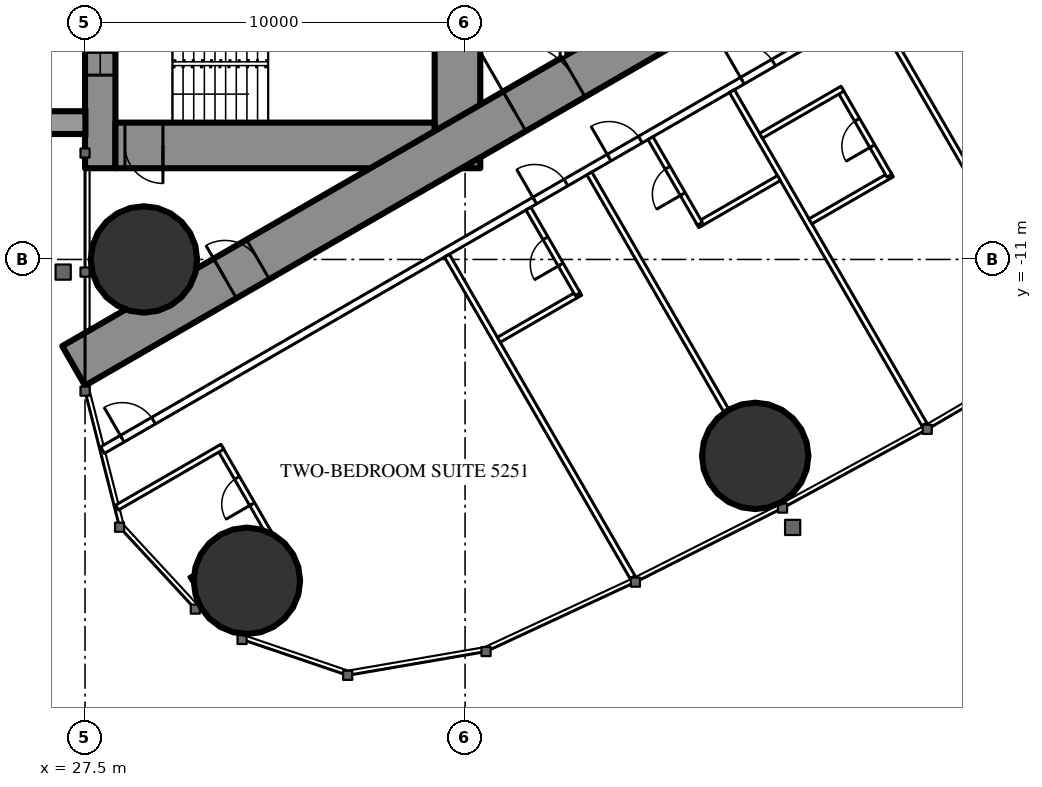
"""IFC4 building model, lengths in metres.
Left out: names, types, materials, properties, quantities, classifications, styles, units other than length and angle.
Written with IfcOpenShell. Run it as: python <this file> out.ifc"""

import sys

from ifc_helpers import new_model, si_unit, direction, frame, frame_2d, origin, origin_2d, place, context, subcontext, project, spatial, rectangle, circle, extrude, element, fill, save


model = new_model("IFC4")
c1 = context("Model", 3, precision=1e-05, world=origin(), true_north=direction((0.0, 1.0)))
c2 = subcontext(c1, "Body", "Model", "MODEL_VIEW")
j1 = project(units=[si_unit("LENGTHUNIT", "METRE"), si_unit("PLANEANGLEUNIT", "RADIAN")], contexts=[c1])
p1 = place(None, origin())
s1 = spatial("IfcSite", under=j1, at=p1, CompositionType="ELEMENT")
p2 = place(p1, origin())
s2 = spatial("IfcBuilding", under=s1, at=p2, CompositionType="ELEMENT")
p3 = place(p2, frame((0.0, 0.0, 194.8)))
s3 = spatial("IfcBuildingStorey", under=s2, at=p3, CompositionType="ELEMENT", Elevation=194.8)
for number, where, z_axis, x_axis in (
    (1, (31.76, -19.456, 0.0), (0.0, 0.0, 1.0), (1.0, 0.0, 0.0)),
    (2, (29.05, -11.0, 0.0), (0.0, 0.0, 1.0), (1.0, 0.0, 0.0)),
    (3, (45.134, -16.168, 0.0), (0.0, 0.0, 1.0), (1.0, 0.0, 0.0)),
):
    element("IfcColumn", number, at=place(p3, frame(where, z_axis=z_axis, x_axis=x_axis)), inside=s3, PredefinedType="COLUMN", context=c2, shape_type="SweptSolid", body=[
        extrude(circle(Radius=1.4, at=origin_2d()), origin(), (0.0, 0.0, 1.0), 3.5),
    ])
p4 = place(p3, frame((27.9, -8.6, 0.0), z_axis=(0.0, 0.0, 1.0), x_axis=(0.0, 1.0, 0.0)))
e4 = element("IfcWall", 4, at=p4, inside=s3, PredefinedType="SHEAR", context=c2, shape_type="SweptSolid", body=[
    extrude(rectangle(XDim=17.2, YDim=0.8, at=frame_2d((8.6, 0.0))), origin(), (0.0, 0.0, 1.0), 3.5),
])
p5 = place(p4, frame((2.45, 0.0, 0.6)))
e5 = element("IfcOpeningElement", 5, at=p5, cuts=e4, PredefinedType="OPENING", context=c2, shape_type="SweptSolid", body=[
    extrude(rectangle(XDim=0.6, YDim=2.1, at=frame_2d((0.3, 1.05))), frame((0.0, 0.41, 0.0), z_axis=(0.0, -1.0, 0.0), x_axis=(1.0, 0.0, 0.0)), (0.0, 0.0, 1.0), 0.82),
])
p6 = place(p4, frame((14.15, 0.0, 0.6)))
e6 = element("IfcOpeningElement", 6, at=p6, cuts=e4, PredefinedType="OPENING", context=c2, shape_type="SweptSolid", body=[
    extrude(rectangle(XDim=0.6, YDim=2.1, at=frame_2d((0.3, 1.05))), frame((0.0, 0.41, 0.0), z_axis=(0.0, -1.0, 0.0), x_axis=(1.0, 0.0, 0.0)), (0.0, 0.0, 1.0), 0.82),
])
p7 = place(p3, frame((37.3, -8.6, 0.0), z_axis=(0.0, 0.0, 1.0), x_axis=(0.0, 1.0, 0.0)))
e7 = element("IfcWall", 7, at=p7, inside=s3, PredefinedType="SHEAR", context=c2, shape_type="SweptSolid", body=[
    extrude(rectangle(XDim=17.2, YDim=1.2, at=frame_2d((8.6, 0.0))), origin(), (0.0, 0.0, 1.0), 3.5),
])
p8 = place(p7, frame((7.7, 0.0, 0.0)))
e8 = element("IfcOpeningElement", 8, at=p8, cuts=e7, PredefinedType="OPENING", context=c2, shape_type="SweptSolid", body=[
    extrude(rectangle(XDim=1.8, YDim=2.2, at=frame_2d((0.9, 1.1))), frame((0.0, 0.61, 0.0), z_axis=(0.0, -1.0, 0.0), x_axis=(1.0, 0.0, 0.0)), (0.0, 0.0, 1.0), 1.22),
])
p9 = place(p3, frame((28.3, -8.0, 0.0), z_axis=(0.0, 0.0, 1.0), x_axis=(1.0, 0.0, 0.0)))
e9 = element("IfcWall", 9, at=p9, inside=s3, PredefinedType="SHEAR", context=c2, shape_type="SweptSolid", body=[
    extrude(rectangle(XDim=8.4, YDim=1.2, at=frame_2d((4.2, 0.0))), origin(), (0.0, 0.0, 1.0), 3.5),
])
p10 = place(p9, frame((0.25, 0.0, 0.0)))
e10 = element("IfcOpeningElement", 10, at=p10, cuts=e9, PredefinedType="OPENING", context=c2, shape_type="SweptSolid", body=[
    extrude(rectangle(XDim=1.0, YDim=2.2, at=frame_2d((0.5, 1.1))), frame((0.0, 0.61, 0.0), z_axis=(0.0, -1.0, 0.0), x_axis=(1.0, 0.0, 0.0)), (0.0, 0.0, 1.0), 1.22),
])
p11 = place(p3, frame((27.2, -13.8, 0.0), z_axis=(0.0, 0.0, 1.0), x_axis=(0.866027159892, 0.499996958321, 0.0)))
e11 = element("IfcWall", 11, at=p11, inside=s3, PredefinedType="SHEAR", context=c2, shape_type="SweptSolid", body=[
    extrude(rectangle(XDim=27.947, YDim=1.2, at=frame_2d((13.973, 0.0))), origin(), (0.0, 0.0, 1.0), 3.5),
])
p12 = place(p11, frame((4.6, 0.0, 0.0)))
e12 = element("IfcOpeningElement", 12, at=p12, cuts=e11, PredefinedType="OPENING", context=c2, shape_type="SweptSolid", body=[
    extrude(rectangle(XDim=1.0, YDim=2.2, at=frame_2d((0.5, 1.1))), frame((0.0, 0.61, 0.0), z_axis=(0.0, -1.0, 0.0), x_axis=(1.0, 0.0, 0.0)), (0.0, 0.0, 1.0), 1.22),
])
p13 = place(p11, frame((13.395, 0.0, 0.0)))
e13 = element("IfcOpeningElement", 13, at=p13, cuts=e11, PredefinedType="OPENING", context=c2, shape_type="SweptSolid", body=[
    extrude(rectangle(XDim=1.8, YDim=2.2, at=frame_2d((0.9, 1.1))), frame((0.0, 0.61, 0.0), z_axis=(0.0, -1.0, 0.0), x_axis=(1.0, 0.0, 0.0)), (0.0, 0.0, 1.0), 1.22),
])
p14 = place(p3, frame((27.959, -16.017, 0.0), z_axis=(0.0, 0.0, 1.0), x_axis=(0.866024151371, 0.500002169237, 0.0)))
e14 = element("IfcWall", 14, at=p14, inside=s3, PredefinedType="PARTITIONING", context=c2, shape_type="SweptSolid", body=[
    extrude(rectangle(XDim=32.034, YDim=0.2, at=frame_2d((16.017, 0.0))), origin(), (0.0, 0.0, 1.0), 3.25),
])
p15 = place(p14, frame((0.6, 0.0, 0.0)))
e15 = element("IfcOpeningElement", 15, at=p15, cuts=e14, PredefinedType="OPENING", context=c2, shape_type="SweptSolid", body=[
    extrude(rectangle(XDim=0.95, YDim=2.2, at=frame_2d((0.475, 1.1))), frame((0.0, 0.11, 0.0), z_axis=(0.0, -1.0, 0.0), x_axis=(1.0, 0.0, 0.0)), (0.0, 0.0, 1.0), 0.22),
])
p16 = place(p14, frame((13.132, 0.0, 0.0)))
e16 = element("IfcOpeningElement", 16, at=p16, cuts=e14, PredefinedType="OPENING", context=c2, shape_type="SweptSolid", body=[
    extrude(rectangle(XDim=0.95, YDim=2.2, at=frame_2d((0.475, 1.1))), frame((0.0, 0.11, 0.0), z_axis=(0.0, -1.0, 0.0), x_axis=(1.0, 0.0, 0.0)), (0.0, 0.0, 1.0), 0.22),
])
p17 = place(p14, frame((15.391, 0.0, 0.0)))
e17 = element("IfcOpeningElement", 17, at=p17, cuts=e14, PredefinedType="OPENING", context=c2, shape_type="SweptSolid", body=[
    extrude(rectangle(XDim=0.95, YDim=2.2, at=frame_2d((0.475, 1.1))), frame((0.0, 0.11, 0.0), z_axis=(0.0, -1.0, 0.0), x_axis=(1.0, 0.0, 0.0)), (0.0, 0.0, 1.0), 0.22),
])
p18 = place(p14, frame((19.441, 0.0, 0.0)))
e18 = element("IfcOpeningElement", 18, at=p18, cuts=e14, PredefinedType="OPENING", context=c2, shape_type="SweptSolid", body=[
    extrude(rectangle(XDim=0.95, YDim=2.2, at=frame_2d((0.475, 1.1))), frame((0.0, 0.11, 0.0), z_axis=(0.0, -1.0, 0.0), x_axis=(1.0, 0.0, 0.0)), (0.0, 0.0, 1.0), 0.22),
])
p19 = place(p14, frame((26.406, 0.0, 0.0)))
e19 = element("IfcOpeningElement", 19, at=p19, cuts=e14, PredefinedType="OPENING", context=c2, shape_type="SweptSolid", body=[
    extrude(rectangle(XDim=0.95, YDim=2.2, at=frame_2d((0.475, 1.1))), frame((0.0, 0.11, 0.0), z_axis=(0.0, -1.0, 0.0), x_axis=(1.0, 0.0, 0.0)), (0.0, 0.0, 1.0), 0.22),
])
p20 = place(p14, frame((28.87, 0.0, 0.0)))
e20 = element("IfcOpeningElement", 20, at=p20, cuts=e14, PredefinedType="OPENING", context=c2, shape_type="SweptSolid", body=[
    extrude(rectangle(XDim=1.8, YDim=2.2, at=frame_2d((0.9, 1.1))), frame((0.0, 0.11, 0.0), z_axis=(0.0, -1.0, 0.0), x_axis=(1.0, 0.0, 0.0)), (0.0, 0.0, 1.0), 0.22),
])
p21 = place(p3, frame((37.022, -10.9, 0.0), z_axis=(0.0, 0.0, 1.0), x_axis=(0.499998620953, -0.866026199976, 0.0)))
e21 = element("IfcWall", 21, at=p21, inside=s3, PredefinedType="PARTITIONING", context=c2, shape_type="SweptSolid", body=[
    extrude(rectangle(XDim=9.77, YDim=0.15, at=frame_2d((4.885, 0.0))), origin(), (0.0, 0.0, 1.0), 3.25),
])
p22 = place(p3, frame((40.769, -8.737, 0.0), z_axis=(0.0, 0.0, 1.0), x_axis=(0.500013115284, -0.866017831539, 0.0)))
e22 = element("IfcWall", 22, at=p22, inside=s3, PredefinedType="PARTITIONING", context=c2, shape_type="SweptSolid", body=[
    extrude(rectangle(XDim=7.198, YDim=0.15, at=frame_2d((3.599, 0.0))), origin(), (0.0, 0.0, 1.0), 2.3),
])
p23 = place(p3, frame((44.521, -6.571, 0.0), z_axis=(0.0, 0.0, 1.0), x_axis=(0.500010457486, -0.866019366068, 0.0)))
e23 = element("IfcWall", 23, at=p23, inside=s3, PredefinedType="PARTITIONING", context=c2, shape_type="SweptSolid", body=[
    extrude(rectangle(XDim=10.126, YDim=0.15, at=frame_2d((5.063, 0.0))), origin(), (0.0, 0.0, 1.0), 3.25),
])
p24 = place(p3, frame((48.275, -4.404, 0.0), z_axis=(0.0, 0.0, 1.0), x_axis=(0.500006004368, -0.866021937133, 0.0)))
e24 = element("IfcWall", 24, at=p24, inside=s3, PredefinedType="PARTITIONING", context=c2, shape_type="SweptSolid", body=[
    extrude(rectangle(XDim=7.279, YDim=0.15, at=frame_2d((3.64, 0.0))), origin(), (0.0, 0.0, 1.0), 2.3),
])
p25 = place(p3, frame((30.269, -19.418, 0.0), z_axis=(0.0, 0.0, 1.0), x_axis=(0.866006523861, 0.500032699561, 0.0)))
e25 = element("IfcWall", 25, at=p25, inside=s3, PredefinedType="PARTITIONING", context=c2, shape_type="SweptSolid", body=[
    extrude(rectangle(XDim=2.475, YDim=0.15, at=frame_2d((1.237, 0.0))), origin(), (0.0, 0.0, 1.0), 3.25),
])
p26 = place(p3, frame((31.048, -15.966, 0.0), z_axis=(0.0, 0.0, 1.0), x_axis=(0.499936506574, -0.866062058628, 0.0)))
e26 = element("IfcWall", 26, at=p26, inside=s3, PredefinedType="PARTITIONING", context=c2, shape_type="SweptSolid", body=[
    extrude(rectangle(XDim=2.6, YDim=0.15, at=frame_2d((1.3, 0.0))), origin(), (0.0, 0.0, 1.0), 2.3),
])
p27 = place(p26, frame((0.9, 0.0, 0.0)))
e27 = element("IfcOpeningElement", 27, at=p27, cuts=e26, PredefinedType="OPENING", context=c2, shape_type="SweptSolid", body=[
    extrude(rectangle(XDim=0.8, YDim=2.2, at=frame_2d((0.4, 1.1))), frame((0.0, 0.085, 0.0), z_axis=(0.0, -1.0, 0.0), x_axis=(1.0, 0.0, 0.0)), (0.0, 0.0, 1.0), 0.17),
])
p28 = place(p3, frame((28.343, -17.528, 0.0), z_axis=(0.0, 0.0, 1.0), x_axis=(0.86600760081, 0.500030834389, 0.0)))
e28 = element("IfcWall", 28, at=p28, inside=s3, PredefinedType="PARTITIONING", context=c2, shape_type="SweptSolid", body=[
    extrude(rectangle(XDim=3.198, YDim=0.15, at=frame_2d((1.599, 0.0))), origin(), (0.0, 0.0, 1.0), 3.25),
])
p29 = place(p3, frame((38.387, -13.115, 0.0), z_axis=(0.0, 0.0, 1.0), x_axis=(0.866073894602, 0.499916002032, 0.0)))
e29 = element("IfcWall", 29, at=p29, inside=s3, PredefinedType="PARTITIONING", context=c2, shape_type="SweptSolid", body=[
    extrude(rectangle(XDim=2.475, YDim=0.15, at=frame_2d((1.238, 0.0))), origin(), (0.0, 0.0, 1.0), 3.25),
])
p30 = place(p3, frame((39.166, -9.663, 0.0), z_axis=(0.0, 0.0, 1.0), x_axis=(0.500006934395, -0.866021400173, 0.0)))
e30 = element("IfcWall", 30, at=p30, inside=s3, PredefinedType="PARTITIONING", context=c2, shape_type="SweptSolid", body=[
    extrude(rectangle(XDim=2.6, YDim=0.15, at=frame_2d((1.3, 0.0))), origin(), (0.0, 0.0, 1.0), 3.25),
])
p31 = place(p30, frame((0.9, 0.0, 0.0)))
e31 = element("IfcOpeningElement", 31, at=p31, cuts=e30, PredefinedType="OPENING", context=c2, shape_type="SweptSolid", body=[
    extrude(rectangle(XDim=0.8, YDim=2.2, at=frame_2d((0.4, 1.1))), frame((0.0, 0.085, 0.0), z_axis=(0.0, -1.0, 0.0), x_axis=(1.0, 0.0, 0.0)), (0.0, 0.0, 1.0), 0.17),
])
p32 = place(p3, frame((43.613, -10.097, 0.0), z_axis=(0.0, 0.0, 1.0), x_axis=(0.866031185235, 0.4999899861, 0.0)))
e32 = element("IfcWall", 32, at=p32, inside=s3, PredefinedType="PARTITIONING", context=c2, shape_type="SweptSolid", body=[
    extrude(rectangle(XDim=2.475, YDim=0.15, at=frame_2d((1.238, 0.0))), origin(), (0.0, 0.0, 1.0), 3.25),
])
p33 = place(p3, frame((42.378, -7.808, 0.0), z_axis=(0.0, 0.0, 1.0), x_axis=(0.500006934395, -0.866021400173, 0.0)))
e33 = element("IfcWall", 33, at=p33, inside=s3, PredefinedType="PARTITIONING", context=c2, shape_type="SweptSolid", body=[
    extrude(rectangle(XDim=2.6, YDim=0.15, at=frame_2d((1.3, 0.0))), origin(), (0.0, 0.0, 1.0), 3.25),
])
p34 = place(p33, frame((0.9, 0.0, 0.0)))
e34 = element("IfcOpeningElement", 34, at=p34, cuts=e33, PredefinedType="OPENING", context=c2, shape_type="SweptSolid", body=[
    extrude(rectangle(XDim=0.8, YDim=2.2, at=frame_2d((0.4, 1.1))), frame((0.0, 0.085, 0.0), z_axis=(0.0, -1.0, 0.0), x_axis=(1.0, 0.0, 0.0)), (0.0, 0.0, 1.0), 0.17),
])
p35 = place(p3, frame((46.586, -9.997, 0.0), z_axis=(0.0, 0.0, 1.0), x_axis=(0.866006523861, 0.500032699561, 0.0)))
e35 = element("IfcWall", 35, at=p35, inside=s3, PredefinedType="PARTITIONING", context=c2, shape_type="SweptSolid", body=[
    extrude(rectangle(XDim=2.475, YDim=0.15, at=frame_2d((1.237, 0.0))), origin(), (0.0, 0.0, 1.0), 3.25),
])
p36 = place(p3, frame((47.365, -6.546, 0.0), z_axis=(0.0, 0.0, 1.0), x_axis=(0.500006934395, -0.866021400173, 0.0)))
e36 = element("IfcWall", 36, at=p36, inside=s3, PredefinedType="PARTITIONING", context=c2, shape_type="SweptSolid", body=[
    extrude(rectangle(XDim=2.6, YDim=0.15, at=frame_2d((1.3, 0.0))), origin(), (0.0, 0.0, 1.0), 3.25),
])
p37 = place(p36, frame((0.9, 0.0, 0.0)))
e37 = element("IfcOpeningElement", 37, at=p37, cuts=e36, PredefinedType="OPENING", context=c2, shape_type="SweptSolid", body=[
    extrude(rectangle(XDim=0.8, YDim=2.2, at=frame_2d((0.4, 1.1))), frame((0.0, 0.085, 0.0), z_axis=(0.0, -1.0, 0.0), x_axis=(1.0, 0.0, 0.0)), (0.0, 0.0, 1.0), 0.17),
])
p38 = place(p3, frame((45.286, -7.746, 0.0), z_axis=(0.0, 0.0, 1.0), x_axis=(0.866006523861, 0.500032699561, 0.0)))
e38 = element("IfcWall", 38, at=p38, inside=s3, PredefinedType="PARTITIONING", context=c2, shape_type="SweptSolid", body=[
    extrude(rectangle(XDim=2.475, YDim=0.15, at=frame_2d((1.237, 0.0))), origin(), (0.0, 0.0, 1.0), 3.25),
])
p39 = place(p3, frame((50.582, -4.688, 0.0), z_axis=(0.0, 0.0, 1.0), x_axis=(0.500006934395, -0.866021400173, 0.0)))
e39 = element("IfcWall", 39, at=p39, inside=s3, PredefinedType="PARTITIONING", context=c2, shape_type="SweptSolid", body=[
    extrude(rectangle(XDim=2.6, YDim=0.15, at=frame_2d((1.3, 0.0))), origin(), (0.0, 0.0, 1.0), 3.25),
])
p40 = place(p39, frame((0.9, 0.0, 0.0)))
e40 = element("IfcOpeningElement", 40, at=p40, cuts=e39, PredefinedType="OPENING", context=c2, shape_type="SweptSolid", body=[
    extrude(rectangle(XDim=0.8, YDim=2.2, at=frame_2d((0.4, 1.1))), frame((0.0, 0.085, 0.0), z_axis=(0.0, -1.0, 0.0), x_axis=(1.0, 0.0, 0.0)), (0.0, 0.0, 1.0), 0.17),
])
p41 = place(p3, frame((40.075, -5.674, 0.0), z_axis=(0.0, 0.0, 1.0), x_axis=(0.0, 1.0, 0.0)))
e41 = element("IfcWall", 41, at=p41, inside=s3, PredefinedType="PARTITIONING", context=c2, shape_type="SweptSolid", body=[
    extrude(rectangle(XDim=6.874, YDim=0.15, at=frame_2d((3.437, 0.0))), origin(), (0.0, 0.0, 1.0), 3.25),
])
p42 = place(p41, frame((2.537, 0.0, 0.0)))
e42 = element("IfcOpeningElement", 42, at=p42, cuts=e41, PredefinedType="OPENING", context=c2, shape_type="SweptSolid", body=[
    extrude(rectangle(XDim=1.8, YDim=2.2, at=frame_2d((0.9, 1.1))), frame((0.0, 0.085, 0.0), z_axis=(0.0, -1.0, 0.0), x_axis=(1.0, 0.0, 0.0)), (0.0, 0.0, 1.0), 0.17),
])
p43 = place(p27, origin())
e43 = element("IfcDoor", 43, at=p43, inside=s3, OperationType="SINGLE_SWING_RIGHT", PredefinedType="DOOR", context=c2, shape_type="SweptSolid", body=[
    extrude(rectangle(XDim=0.8, YDim=2.2, at=frame_2d((0.4, 1.1))), frame((0.0, 0.025, 0.0), z_axis=(0.0, -1.0, 0.0), x_axis=(1.0, 0.0, 0.0)), (0.0, 0.0, 1.0), 0.05),
])
fill(e27, e43)
p44 = place(p15, origin())
e44 = element("IfcDoor", 44, at=p44, inside=s3, OperationType="SINGLE_SWING_LEFT", PredefinedType="DOOR", context=c2, shape_type="SweptSolid", body=[
    extrude(rectangle(XDim=0.95, YDim=2.2, at=frame_2d((0.475, 1.1))), frame((0.0, 0.025, 0.0), z_axis=(0.0, -1.0, 0.0), x_axis=(1.0, 0.0, 0.0)), (0.0, 0.0, 1.0), 0.05),
])
fill(e15, e44)
p45 = place(p31, origin())
e45 = element("IfcDoor", 45, at=p45, inside=s3, OperationType="SINGLE_SWING_RIGHT", PredefinedType="DOOR", context=c2, shape_type="SweptSolid", body=[
    extrude(rectangle(XDim=0.8, YDim=2.2, at=frame_2d((0.4, 1.1))), frame((0.0, 0.025, 0.0), z_axis=(0.0, -1.0, 0.0), x_axis=(1.0, 0.0, 0.0)), (0.0, 0.0, 1.0), 0.05),
])
fill(e31, e45)
p46 = place(p16, origin())
e46 = element("IfcDoor", 46, at=p46, inside=s3, OperationType="SINGLE_SWING_LEFT", PredefinedType="DOOR", context=c2, shape_type="SweptSolid", body=[
    extrude(rectangle(XDim=0.95, YDim=2.2, at=frame_2d((0.475, 1.1))), frame((0.0, 0.025, 0.0), z_axis=(0.0, -1.0, 0.0), x_axis=(1.0, 0.0, 0.0)), (0.0, 0.0, 1.0), 0.05),
])
fill(e16, e46)
p47 = place(p34, origin())
e47 = element("IfcDoor", 47, at=p47, inside=s3, OperationType="SINGLE_SWING_RIGHT", PredefinedType="DOOR", context=c2, shape_type="SweptSolid", body=[
    extrude(rectangle(XDim=0.8, YDim=2.2, at=frame_2d((0.4, 1.1))), frame((0.0, 0.025, 0.0), z_axis=(0.0, -1.0, 0.0), x_axis=(1.0, 0.0, 0.0)), (0.0, 0.0, 1.0), 0.05),
])
fill(e34, e47)
p48 = place(p17, origin())
e48 = element("IfcDoor", 48, at=p48, inside=s3, OperationType="SINGLE_SWING_LEFT", PredefinedType="DOOR", context=c2, shape_type="SweptSolid", body=[
    extrude(rectangle(XDim=0.95, YDim=2.2, at=frame_2d((0.475, 1.1))), frame((0.0, 0.025, 0.0), z_axis=(0.0, -1.0, 0.0), x_axis=(1.0, 0.0, 0.0)), (0.0, 0.0, 1.0), 0.05),
])
fill(e17, e48)
p49 = place(p37, origin())
e49 = element("IfcDoor", 49, at=p49, inside=s3, OperationType="SINGLE_SWING_RIGHT", PredefinedType="DOOR", context=c2, shape_type="SweptSolid", body=[
    extrude(rectangle(XDim=0.8, YDim=2.2, at=frame_2d((0.4, 1.1))), frame((0.0, 0.025, 0.0), z_axis=(0.0, -1.0, 0.0), x_axis=(1.0, 0.0, 0.0)), (0.0, 0.0, 1.0), 0.05),
])
fill(e37, e49)
p50 = place(p18, origin())
e50 = element("IfcDoor", 50, at=p50, inside=s3, OperationType="SINGLE_SWING_LEFT", PredefinedType="DOOR", context=c2, shape_type="SweptSolid", body=[
    extrude(rectangle(XDim=0.95, YDim=2.2, at=frame_2d((0.475, 1.1))), frame((0.0, 0.025, 0.0), z_axis=(0.0, -1.0, 0.0), x_axis=(1.0, 0.0, 0.0)), (0.0, 0.0, 1.0), 0.05),
])
fill(e18, e50)
p51 = place(p12, origin())
e51 = element("IfcDoor", 51, at=p51, inside=s3, OperationType="SINGLE_SWING_LEFT", PredefinedType="DOOR", context=c2, shape_type="SweptSolid", body=[
    extrude(rectangle(XDim=1.0, YDim=2.2, at=frame_2d((0.5, 1.1))), frame((0.0, 0.025, 0.0), z_axis=(0.0, -1.0, 0.0), x_axis=(1.0, 0.0, 0.0)), (0.0, 0.0, 1.0), 0.05),
])
fill(e12, e51)
p52 = place(p13, origin())
e52 = element("IfcDoor", 52, at=p52, inside=s3, OperationType="DOUBLE_DOOR_SINGLE_SWING", PredefinedType="DOOR", context=c2, shape_type="SweptSolid", body=[
    extrude(rectangle(XDim=1.8, YDim=2.2, at=frame_2d((0.9, 1.1))), frame((0.0, 0.025, 0.0), z_axis=(0.0, -1.0, 0.0), x_axis=(1.0, 0.0, 0.0)), (0.0, 0.0, 1.0), 0.05),
])
fill(e13, e52)
p53 = place(p10, origin())
e53 = element("IfcDoor", 53, at=p53, inside=s3, OperationType="SINGLE_SWING_RIGHT", PredefinedType="DOOR", context=c2, shape_type="SweptSolid", body=[
    extrude(rectangle(XDim=1.0, YDim=2.2, at=frame_2d((0.5, 1.1))), frame((0.0, 0.025, 0.0), z_axis=(0.0, -1.0, 0.0), x_axis=(1.0, 0.0, 0.0)), (0.0, 0.0, 1.0), 0.05),
])
fill(e10, e53)
p54 = place(p5, origin())
e54 = element("IfcWindow", 54, at=p54, inside=s3, PartitioningType="SINGLE_PANEL", PredefinedType="WINDOW", context=c2, shape_type="SweptSolid", body=[
    extrude(rectangle(XDim=0.6, YDim=2.1, at=frame_2d((0.3, 1.05))), frame((0.0, 0.03, 0.0), z_axis=(0.0, -1.0, 0.0), x_axis=(1.0, 0.0, 0.0)), (0.0, 0.0, 1.0), 0.06),
])
fill(e5, e54)
save(model, sys.argv[1])
